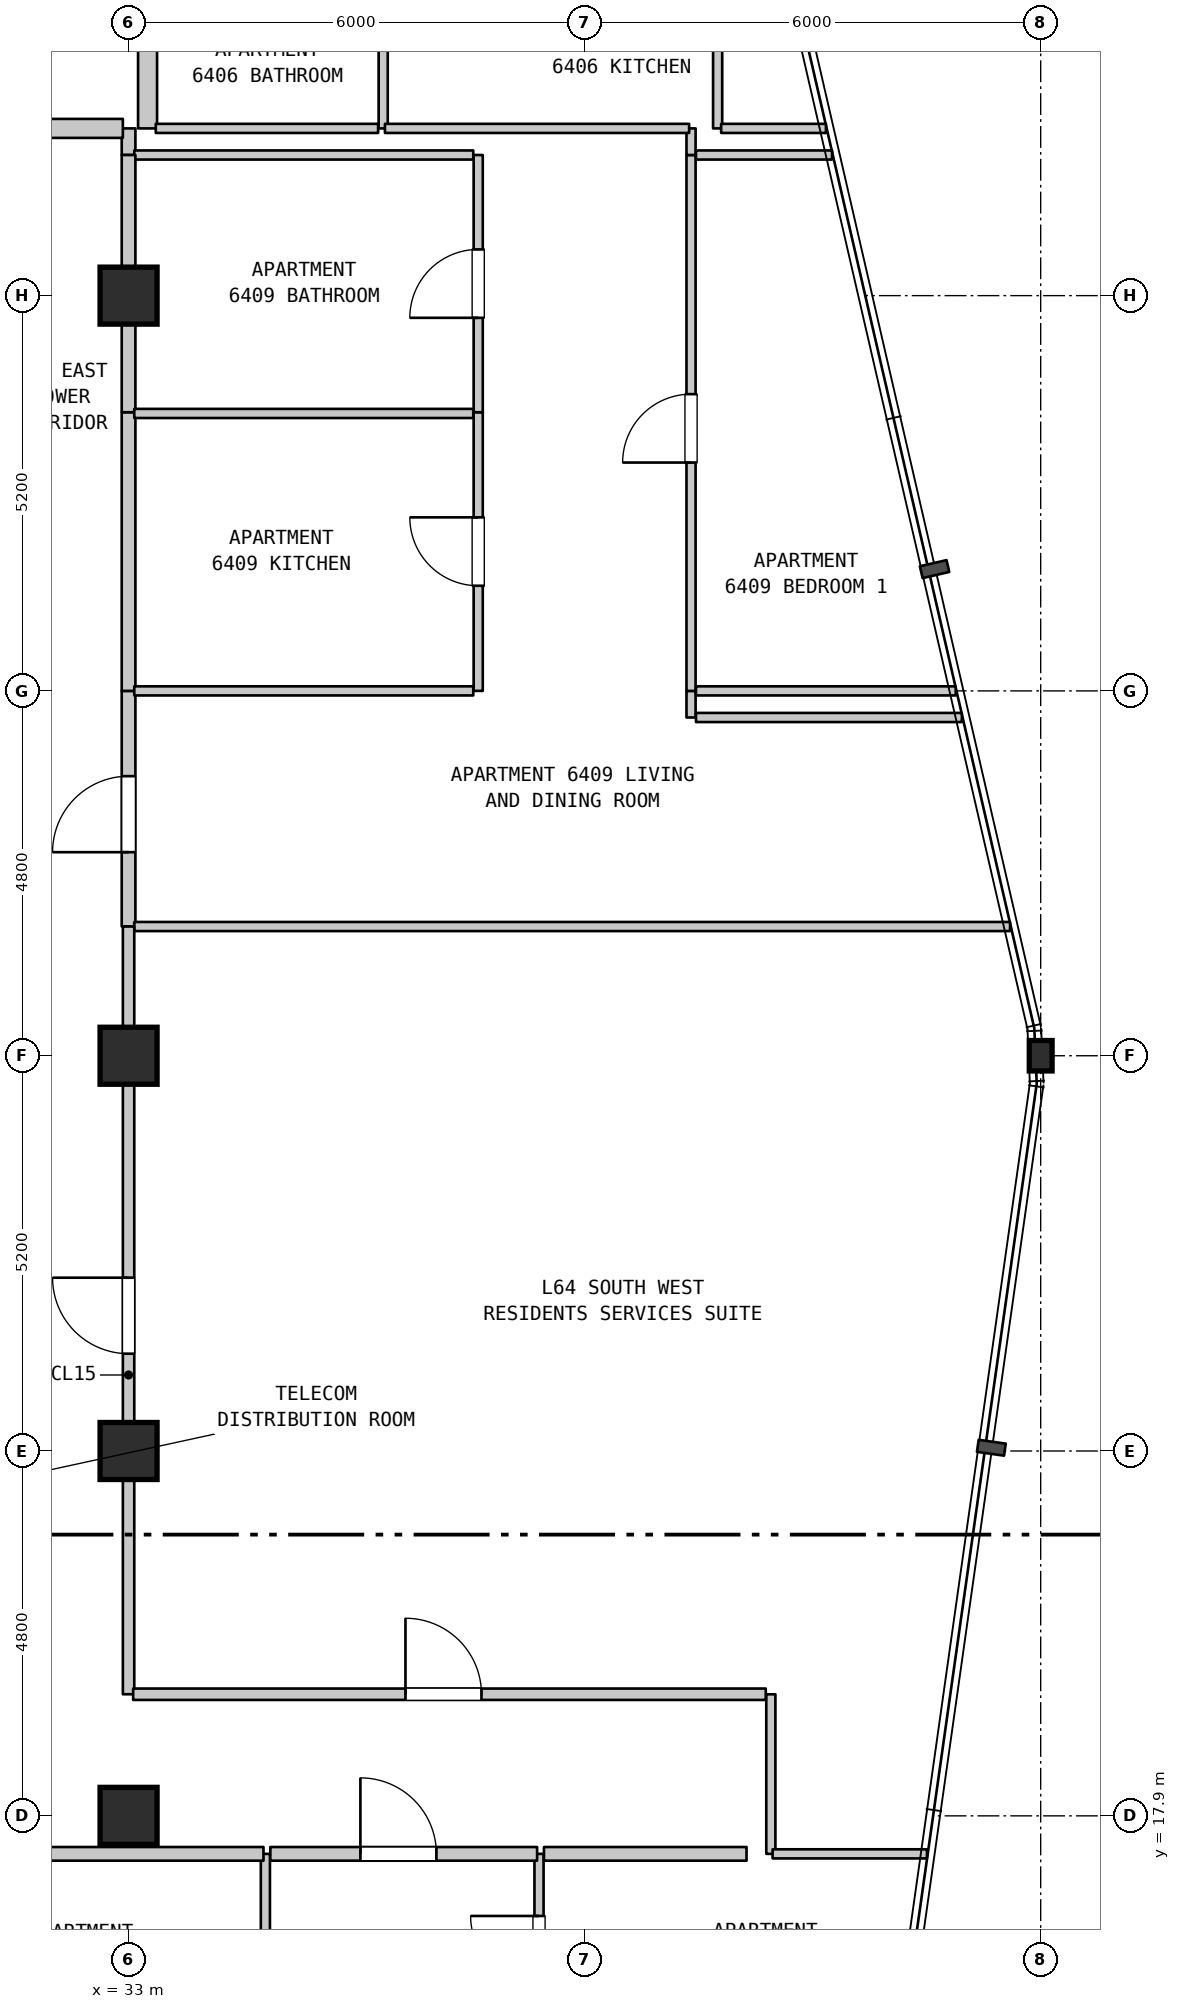
"""IFC4 building model, lengths in metres.
Left out: names, types, materials, properties, quantities, classifications, styles, units other than length and angle.
Written with IfcOpenShell. Run it as: python <this file> out.ifc"""

import sys

from ifc_helpers import new_model, si_unit, direction, frame, frame_2d, origin, origin_2d, place, context, subcontext, project, spatial, rectangle, i_section, extrude, element, fill, save


model = new_model("IFC4")
c1 = context("Model", 3, precision=1e-05, world=origin(), true_north=direction((0.0, 1.0)))
c2 = subcontext(c1, "Body", "Model", "MODEL_VIEW")
j1 = project(units=[si_unit("LENGTHUNIT", "METRE"), si_unit("PLANEANGLEUNIT", "RADIAN")], contexts=[c1])
p1 = place(None, origin())
s1 = spatial("IfcSite", under=j1, at=p1, CompositionType="ELEMENT")
p2 = place(p1, origin())
s2 = spatial("IfcBuilding", under=s1, at=p2, CompositionType="ELEMENT")
p3 = place(p2, frame((0.0, 0.0, 258.4)))
s3 = spatial("IfcBuildingStorey", under=s2, at=p3, CompositionType="ELEMENT", Elevation=258.4)
for number, where, z_axis, x_axis in (
    (1, (33.0, 17.9, 0.0), (0.0, 0.0, 1.0), (1.0, 0.0, 0.0)),
    (2, (33.0, 22.7, 0.0), (0.0, 0.0, 1.0), (1.0, 0.0, 0.0)),
    (3, (33.0, 27.9, 0.0), (0.0, 0.0, 1.0), (1.0, 0.0, 0.0)),
    (4, (33.0, 37.9, 0.0), (0.0, 0.0, 1.0), (1.0, 0.0, 0.0)),
):
    element("IfcColumn", number, at=place(p3, frame(where, z_axis=z_axis, x_axis=x_axis)), inside=s3, PredefinedType="COLUMN", context=c2, shape_type="SweptSolid", body=[
        extrude(rectangle(XDim=0.75, YDim=0.75, at=origin_2d()), origin(), (0.0, 0.0, 1.0), 3.7),
    ])
p4 = place(p3, frame((45.0, 27.9, 0.0), z_axis=(0.0, 0.0, 1.0), x_axis=(1.0, 0.0, 0.0)))
e5 = element("IfcColumn", 5, at=p4, inside=s3, PredefinedType="COLUMN", context=c2, shape_type="SweptSolid", body=[
    extrude(i_section(OverallWidth=0.3, OverallDepth=0.4, WebThickness=0.013, FlangeThickness=0.024, FilletRadius=0.027, at=origin_2d()), origin(), (0.0, 0.0, 1.0), 3.7),
])
p5 = place(p3, frame((33.0, 19.5, 0.0), z_axis=(0.0, 0.0, 1.0), x_axis=(0.0, 1.0, 0.0)))
e6 = element("IfcWall", 6, at=p5, inside=s3, PredefinedType="STANDARD", context=c2, shape_type="SweptSolid", body=[
    extrude(rectangle(XDim=8.4, YDim=0.15, at=frame_2d((4.2, 0.0))), origin(), (0.0, 0.0, 1.0), 3.1),
])
p6 = place(p5, frame((4.48, 0.0, 0.0)))
e7 = element("IfcOpeningElement", 7, at=p6, cuts=e6, PredefinedType="OPENING", context=c2, shape_type="SweptSolid", body=[
    extrude(rectangle(XDim=1.0, YDim=2.15, at=frame_2d((0.5, 1.075))), frame((0.0, 0.085, 0.0), z_axis=(0.0, -1.0, 0.0), x_axis=(1.0, 0.0, 0.0)), (0.0, 0.0, 1.0), 0.17),
])
p7 = place(p3, frame((33.0, 29.6, 0.0), z_axis=(0.0, 0.0, 1.0), x_axis=(0.0, 1.0, 0.0)))
e8 = element("IfcWall", 8, at=p7, inside=s3, PredefinedType="STANDARD", context=c2, shape_type="SweptSolid", body=[
    extrude(rectangle(XDim=3.1, YDim=0.18, at=frame_2d((1.55, 0.0))), origin(), (0.0, 0.0, 1.0), 2.89),
])
p8 = place(p7, frame((0.978, 0.0, 0.0)))
e9 = element("IfcOpeningElement", 9, at=p8, cuts=e8, PredefinedType="OPENING", context=c2, shape_type="SweptSolid", body=[
    extrude(rectangle(XDim=1.0, YDim=2.15, at=frame_2d((0.5, 1.075))), frame((0.0, 0.1, 0.0), z_axis=(0.0, -1.0, 0.0), x_axis=(1.0, 0.0, 0.0)), (0.0, 0.0, 1.0), 0.2),
])
p9 = place(p3, frame((33.0, 32.7, 0.0), z_axis=(0.0, 0.0, 1.0), x_axis=(0.0, 1.0, 0.0)))
e10 = element("IfcWall", 10, at=p9, inside=s3, PredefinedType="STANDARD", context=c2, shape_type="SweptSolid", body=[
    extrude(rectangle(XDim=3.666, YDim=0.18, at=frame_2d((1.833, 0.0))), origin(), (0.0, 0.0, 1.0), 2.89),
])
p10 = place(p3, frame((33.0, 36.366, 0.0), z_axis=(0.0, 0.0, 1.0), x_axis=(0.0, 1.0, 0.0)))
e11 = element("IfcWall", 11, at=p10, inside=s3, PredefinedType="STANDARD", context=c2, shape_type="SweptSolid", body=[
    extrude(rectangle(XDim=1.534, YDim=0.18, at=frame_2d((0.767, 0.0))), origin(), (0.0, 0.0, 1.0), 2.89),
])
p11 = place(p3, frame((33.0, 39.75, 0.0), z_axis=(0.0, 0.0, 1.0), x_axis=(0.0, 1.0, 0.0)))
e12 = element("IfcWall", 12, at=p11, inside=s3, PredefinedType="STANDARD", context=c2, shape_type="SweptSolid", body=[
    extrude(rectangle(XDim=0.35, YDim=0.18, at=frame_2d((0.175, 0.0))), origin(), (0.0, 0.0, 1.0), 3.39),
])
p12 = place(p3, frame((33.25, 40.1, 0.0), z_axis=(0.0, 0.0, 1.0), x_axis=(0.0, 1.0, 0.0)))
e13 = element("IfcWall", 13, at=p12, inside=s3, PredefinedType="STANDARD", context=c2, shape_type="SweptSolid", body=[
    extrude(rectangle(XDim=2.3, YDim=0.25, at=frame_2d((1.15, 0.0))), origin(), (0.0, 0.0, 1.0), 3.39),
])
p13 = place(p3, frame((34.8, 15.008, 0.0), z_axis=(0.0, 0.0, 1.0), x_axis=(0.0, 1.0, 0.0)))
e14 = element("IfcWall", 14, at=p13, inside=s3, PredefinedType="PARTITIONING", context=c2, shape_type="SweptSolid", body=[
    extrude(rectangle(XDim=2.392, YDim=0.12, at=frame_2d((1.196, 0.0))), origin(), (0.0, 0.0, 1.0), 3.39),
])
p14 = place(p3, frame((36.35, 40.1, 0.0), z_axis=(0.0, 0.0, 1.0), x_axis=(0.0, 1.0, 0.0)))
e15 = element("IfcWall", 15, at=p14, inside=s3, PredefinedType="PARTITIONING", context=c2, shape_type="SweptSolid", body=[
    extrude(rectangle(XDim=2.3, YDim=0.12, at=frame_2d((1.15, 0.0))), origin(), (0.0, 0.0, 1.0), 3.39),
])
p15 = place(p3, frame((37.6, 32.7, 0.0), z_axis=(0.0, 0.0, 1.0), x_axis=(0.0, 1.0, 0.0)))
e16 = element("IfcWall", 16, at=p15, inside=s3, PredefinedType="PARTITIONING", context=c2, shape_type="SweptSolid", body=[
    extrude(rectangle(XDim=3.666, YDim=0.12, at=frame_2d((1.833, 0.0))), origin(), (0.0, 0.0, 1.0), 3.39),
])
p16 = place(p15, frame((1.383, 0.0, 0.0)))
e17 = element("IfcOpeningElement", 17, at=p16, cuts=e16, PredefinedType="OPENING", context=c2, shape_type="SweptSolid", body=[
    extrude(rectangle(XDim=0.9, YDim=2.15, at=frame_2d((0.45, 1.075))), frame((0.0, 0.07, 0.0), z_axis=(0.0, -1.0, 0.0), x_axis=(1.0, 0.0, 0.0)), (0.0, 0.0, 1.0), 0.14),
])
p17 = place(p3, frame((37.6, 36.366, 0.0), z_axis=(0.0, 0.0, 1.0), x_axis=(0.0, 1.0, 0.0)))
e18 = element("IfcWall", 18, at=p17, inside=s3, PredefinedType="PARTITIONING", context=c2, shape_type="SweptSolid", body=[
    extrude(rectangle(XDim=3.384, YDim=0.12, at=frame_2d((1.692, 0.0))), origin(), (0.0, 0.0, 1.0), 3.39),
])
p18 = place(p17, frame((1.242, 0.0, 0.0)))
e19 = element("IfcOpeningElement", 19, at=p18, cuts=e18, PredefinedType="OPENING", context=c2, shape_type="SweptSolid", body=[
    extrude(rectangle(XDim=0.9, YDim=2.1, at=frame_2d((0.45, 1.05))), frame((0.0, 0.07, 0.0), z_axis=(0.0, -1.0, 0.0), x_axis=(1.0, 0.0, 0.0)), (0.0, 0.0, 1.0), 0.14),
])
p19 = place(p3, frame((38.4, 15.008, 0.0), z_axis=(0.0, 0.0, 1.0), x_axis=(0.0, 1.0, 0.0)))
e20 = element("IfcWall", 20, at=p19, inside=s3, PredefinedType="PARTITIONING", context=c2, shape_type="SweptSolid", body=[
    extrude(rectangle(XDim=2.392, YDim=0.12, at=frame_2d((1.196, 0.0))), origin(), (0.0, 0.0, 1.0), 3.39),
])
p20 = place(p19, frame((0.675, 0.0, 0.0)))
e21 = element("IfcOpeningElement", 21, at=p20, cuts=e20, PredefinedType="OPENING", context=c2, shape_type="SweptSolid", body=[
    extrude(rectangle(XDim=0.9, YDim=2.1, at=frame_2d((0.45, 1.05))), frame((0.0, 0.07, 0.0), z_axis=(0.0, -1.0, 0.0), x_axis=(1.0, 0.0, 0.0)), (0.0, 0.0, 1.0), 0.14),
])
p21 = place(p3, frame((40.4, 32.35, 0.0), z_axis=(0.0, 0.0, 1.0), x_axis=(0.0, 1.0, 0.0)))
e22 = element("IfcWall", 22, at=p21, inside=s3, PredefinedType="PARTITIONING", context=c2, shape_type="SweptSolid", body=[
    extrude(rectangle(XDim=0.35, YDim=0.12, at=frame_2d((0.175, 0.0))), origin(), (0.0, 0.0, 1.0), 3.39),
])
p22 = place(p3, frame((40.4, 32.7, 0.0), z_axis=(0.0, 0.0, 1.0), x_axis=(0.0, 1.0, 0.0)))
e23 = element("IfcWall", 23, at=p22, inside=s3, PredefinedType="PARTITIONING", context=c2, shape_type="SweptSolid", body=[
    extrude(rectangle(XDim=7.05, YDim=0.12, at=frame_2d((3.525, 0.0))), origin(), (0.0, 0.0, 1.0), 3.39),
])
p23 = place(p22, frame((3.004, 0.0, 0.0)))
e24 = element("IfcOpeningElement", 24, at=p23, cuts=e23, PredefinedType="OPENING", context=c2, shape_type="SweptSolid", body=[
    extrude(rectangle(XDim=0.9, YDim=2.15, at=frame_2d((0.45, 1.075))), frame((0.0, 0.07, 0.0), z_axis=(0.0, -1.0, 0.0), x_axis=(1.0, 0.0, 0.0)), (0.0, 0.0, 1.0), 0.14),
])
p24 = place(p3, frame((40.4, 39.75, 0.0), z_axis=(0.0, 0.0, 1.0), x_axis=(0.0, 1.0, 0.0)))
e25 = element("IfcWall", 25, at=p24, inside=s3, PredefinedType="PARTITIONING", context=c2, shape_type="SweptSolid", body=[
    extrude(rectangle(XDim=0.35, YDim=0.12, at=frame_2d((0.175, 0.0))), origin(), (0.0, 0.0, 1.0), 3.39),
])
p25 = place(p3, frame((40.75, 40.1, 0.0), z_axis=(0.0, 0.0, 1.0), x_axis=(0.0, 1.0, 0.0)))
e26 = element("IfcWall", 26, at=p25, inside=s3, PredefinedType="PARTITIONING", context=c2, shape_type="SweptSolid", body=[
    extrude(rectangle(XDim=2.3, YDim=0.12, at=frame_2d((1.15, 0.0))), origin(), (0.0, 0.0, 1.0), 3.39),
])
p26 = place(p3, frame((41.45, 17.4, 0.0), z_axis=(0.0, 0.0, 1.0), x_axis=(0.0, 1.0, 0.0)))
e27 = element("IfcWall", 27, at=p26, inside=s3, PredefinedType="PARTITIONING", context=c2, shape_type="SweptSolid", body=[
    extrude(rectangle(XDim=2.099, YDim=0.12, at=frame_2d((1.05, 0.0))), origin(), (0.0, 0.0, 1.0), 3.39),
])
p27 = place(p3, frame((29.585, 17.4, 0.0), z_axis=(0.0, 0.0, 1.0), x_axis=(1.0, 0.0, 0.0)))
e28 = element("IfcWall", 28, at=p27, inside=s3, PredefinedType="STANDARD", context=c2, shape_type="SweptSolid", body=[
    extrude(rectangle(XDim=5.19, YDim=0.18, at=frame_2d((2.595, 0.0))), origin(), (0.0, 0.0, 1.0), 3.39),
])
p28 = place(p3, frame((34.865, 17.4, 0.0), z_axis=(0.0, 0.0, 1.0), x_axis=(1.0, 0.0, 0.0)))
e29 = element("IfcWall", 29, at=p28, inside=s3, PredefinedType="STANDARD", context=c2, shape_type="SweptSolid", body=[
    extrude(rectangle(XDim=3.51, YDim=0.18, at=frame_2d((1.755, 0.0))), origin(), (0.0, 0.0, 1.0), 3.39),
])
p29 = place(p28, frame((1.185, 0.0, 0.0)))
e30 = element("IfcOpeningElement", 30, at=p29, cuts=e29, PredefinedType="OPENING", context=c2, shape_type="SweptSolid", body=[
    extrude(rectangle(XDim=1.0, YDim=2.15, at=frame_2d((0.5, 1.075))), frame((0.0, 0.1, 0.0), z_axis=(0.0, -1.0, 0.0), x_axis=(1.0, 0.0, 0.0)), (0.0, 0.0, 1.0), 0.2),
])
p30 = place(p3, frame((38.465, 17.4, 0.0), z_axis=(0.0, 0.0, 1.0), x_axis=(1.0, 0.0, 0.0)))
e31 = element("IfcWall", 31, at=p30, inside=s3, PredefinedType="STANDARD", context=c2, shape_type="SweptSolid", body=[
    extrude(rectangle(XDim=2.665, YDim=0.18, at=frame_2d((1.333, 0.0))), origin(), (0.0, 0.0, 1.0), 3.39),
])
p31 = place(p3, frame((41.473, 17.4, 0.0), z_axis=(0.0, 0.0, 1.0), x_axis=(1.0, 0.0, 0.0)))
e32 = element("IfcWall", 32, at=p31, inside=s3, PredefinedType="PARTITIONING", context=c2, shape_type="SweptSolid", body=[
    extrude(rectangle(XDim=2.031, YDim=0.12, at=frame_2d((1.016, 0.0))), origin(), (0.0, 0.0, 1.0), 3.39),
])
p32 = place(p3, frame((33.06, 19.5, 0.0), z_axis=(0.0, 0.0, 1.0), x_axis=(1.0, 0.0, 0.0)))
e33 = element("IfcWall", 33, at=p32, inside=s3, PredefinedType="STANDARD", context=c2, shape_type="SweptSolid", body=[
    extrude(rectangle(XDim=8.323, YDim=0.15, at=frame_2d((4.162, 0.0))), origin(), (0.0, 0.0, 1.0), 3.39),
])
p33 = place(p32, frame((3.583, 0.0, 0.0)))
e34 = element("IfcOpeningElement", 34, at=p33, cuts=e33, PredefinedType="OPENING", context=c2, shape_type="SweptSolid", body=[
    extrude(rectangle(XDim=1.0, YDim=2.15, at=frame_2d((0.5, 1.075))), frame((0.0, 0.085, 0.0), z_axis=(0.0, -1.0, 0.0), x_axis=(1.0, 0.0, 0.0)), (0.0, 0.0, 1.0), 0.17),
])
p34 = place(p3, frame((33.075, 29.6, 0.0), z_axis=(0.0, 0.0, 1.0), x_axis=(1.0, 0.0, 0.0)))
e35 = element("IfcWall", 35, at=p34, inside=s3, PredefinedType="PARTITIONING", context=c2, shape_type="SweptSolid", body=[
    extrude(rectangle(XDim=11.522, YDim=0.12, at=frame_2d((5.761, 0.0))), origin(), (0.0, 0.0, 1.0), 3.39),
])
p35 = place(p3, frame((40.465, 32.35, 0.0), z_axis=(0.0, 0.0, 1.0), x_axis=(1.0, 0.0, 0.0)))
e36 = element("IfcWall", 36, at=p35, inside=s3, PredefinedType="PARTITIONING", context=c2, shape_type="SweptSolid", body=[
    extrude(rectangle(XDim=3.498, YDim=0.12, at=frame_2d((1.749, 0.0))), origin(), (0.0, 0.0, 1.0), 3.39),
])
p36 = place(p3, frame((33.075, 32.7, 0.0), z_axis=(0.0, 0.0, 1.0), x_axis=(1.0, 0.0, 0.0)))
e37 = element("IfcWall", 37, at=p36, inside=s3, PredefinedType="PARTITIONING", context=c2, shape_type="SweptSolid", body=[
    extrude(rectangle(XDim=4.46, YDim=0.12, at=frame_2d((2.23, 0.0))), origin(), (0.0, 0.0, 1.0), 3.39),
])
p37 = place(p3, frame((40.465, 32.7, 0.0), z_axis=(0.0, 0.0, 1.0), x_axis=(1.0, 0.0, 0.0)))
e38 = element("IfcWall", 38, at=p37, inside=s3, PredefinedType="PARTITIONING", context=c2, shape_type="SweptSolid", body=[
    extrude(rectangle(XDim=3.417, YDim=0.12, at=frame_2d((1.708, 0.0))), origin(), (0.0, 0.0, 1.0), 3.39),
])
for number, where, z_axis, x_axis in (
    (39, (33.075, 36.35, 0.0), (0.0, 0.0, 1.0), (1.0, 0.0, 0.0)),
    (40, (33.075, 39.75, 0.0), (0.0, 0.0, 1.0), (1.0, 0.0, 0.0)),
):
    element("IfcWall", number, at=place(p3, frame(where, z_axis=z_axis, x_axis=x_axis)), inside=s3, PredefinedType="PARTITIONING", context=c2, shape_type="SweptSolid", body=[
        extrude(rectangle(XDim=4.46, YDim=0.12, at=frame_2d((2.23, 0.0))), origin(), (0.0, 0.0, 1.0), 3.39),
    ])
p38 = place(p3, frame((40.465, 39.75, 0.0), z_axis=(0.0, 0.0, 1.0), x_axis=(1.0, 0.0, 0.0)))
e41 = element("IfcWall", 41, at=p38, inside=s3, PredefinedType="PARTITIONING", context=c2, shape_type="SweptSolid", body=[
    extrude(rectangle(XDim=1.79, YDim=0.12, at=frame_2d((0.895, 0.0))), origin(), (0.0, 0.0, 1.0), 3.39),
])
p39 = place(p3, frame((29.86, 40.1, 0.0), z_axis=(0.0, 0.0, 1.0), x_axis=(1.0, 0.0, 0.0)))
e42 = element("IfcWall", 42, at=p39, inside=s3, PredefinedType="STANDARD", context=c2, shape_type="SweptSolid", body=[
    extrude(rectangle(XDim=3.065, YDim=0.25, at=frame_2d((1.532, 0.0))), origin(), (0.0, 0.0, 1.0), 3.39),
])
p40 = place(p3, frame((33.358, 40.1, 0.0), z_axis=(0.0, 0.0, 1.0), x_axis=(1.0, 0.0, 0.0)))
e43 = element("IfcWall", 43, at=p40, inside=s3, PredefinedType="PARTITIONING", context=c2, shape_type="SweptSolid", body=[
    extrude(rectangle(XDim=2.925, YDim=0.12, at=frame_2d((1.462, 0.0))), origin(), (0.0, 0.0, 1.0), 3.39),
])
p41 = place(p3, frame((36.373, 40.1, 0.0), z_axis=(0.0, 0.0, 1.0), x_axis=(1.0, 0.0, 0.0)))
e44 = element("IfcWall", 44, at=p41, inside=s3, PredefinedType="PARTITIONING", context=c2, shape_type="SweptSolid", body=[
    extrude(rectangle(XDim=4.002, YDim=0.12, at=frame_2d((2.001, 0.0))), origin(), (0.0, 0.0, 1.0), 3.39),
])
p42 = place(p3, frame((40.796, 40.1, 0.0), z_axis=(0.0, 0.0, 1.0), x_axis=(1.0, 0.0, 0.0)))
e45 = element("IfcWall", 45, at=p42, inside=s3, PredefinedType="PARTITIONING", context=c2, shape_type="SweptSolid", body=[
    extrude(rectangle(XDim=1.379, YDim=0.12, at=frame_2d((0.689, 0.0))), origin(), (0.0, 0.0, 1.0), 3.39),
])
p43 = place(p3, frame((33.0, 27.9, 0.0), z_axis=(0.0, 0.0, 1.0), x_axis=(0.0, 1.0, 0.0)))
e46 = element("IfcWall", 46, at=p43, inside=s3, PredefinedType="STANDARD", context=c2, shape_type="SweptSolid", body=[
    extrude(rectangle(XDim=1.7, YDim=0.15, at=frame_2d((0.85, 0.0))), origin(), (0.0, 0.0, 1.0), 2.89),
])
p44 = place(p3, frame((33.0, 37.9, 0.0), z_axis=(0.0, 0.0, 1.0), x_axis=(0.0, 1.0, 0.0)))
e47 = element("IfcWall", 47, at=p44, inside=s3, PredefinedType="STANDARD", context=c2, shape_type="SweptSolid", body=[
    extrude(rectangle(XDim=1.85, YDim=0.18, at=frame_2d((0.925, 0.0))), origin(), (0.0, 0.0, 1.0), 2.79),
])
p45 = place(p6, origin())
e48 = element("IfcDoor", 48, at=p45, inside=s3, OperationType="SINGLE_SWING_RIGHT", PredefinedType="DOOR", context=c2, shape_type="SweptSolid", body=[
    extrude(rectangle(XDim=1.0, YDim=2.15, at=frame_2d((0.5, 1.075))), frame((0.0, 0.025, 0.0), z_axis=(0.0, -1.0, 0.0), x_axis=(1.0, 0.0, 0.0)), (0.0, 0.0, 1.0), 0.05),
])
fill(e7, e48)
p46 = place(p8, origin())
e49 = element("IfcDoor", 49, at=p46, inside=s3, OperationType="SINGLE_SWING_LEFT", PredefinedType="DOOR", context=c2, shape_type="SweptSolid", body=[
    extrude(rectangle(XDim=1.0, YDim=2.15, at=frame_2d((0.5, 1.075))), frame((0.0, 0.025, 0.0), z_axis=(0.0, -1.0, 0.0), x_axis=(1.0, 0.0, 0.0)), (0.0, 0.0, 1.0), 0.05),
])
fill(e9, e49)
p47 = place(p16, origin())
e50 = element("IfcDoor", 50, at=p47, inside=s3, OperationType="SINGLE_SWING_RIGHT", PredefinedType="DOOR", context=c2, shape_type="SweptSolid", body=[
    extrude(rectangle(XDim=0.9, YDim=2.15, at=frame_2d((0.45, 1.075))), frame((0.0, 0.025, 0.0), z_axis=(0.0, -1.0, 0.0), x_axis=(1.0, 0.0, 0.0)), (0.0, 0.0, 1.0), 0.05),
])
fill(e17, e50)
p48 = place(p18, origin())
e51 = element("IfcDoor", 51, at=p48, inside=s3, OperationType="SINGLE_SWING_LEFT", PredefinedType="DOOR", context=c2, shape_type="SweptSolid", body=[
    extrude(rectangle(XDim=0.9, YDim=2.1, at=frame_2d((0.45, 1.05))), frame((0.0, 0.025, 0.0), z_axis=(0.0, -1.0, 0.0), x_axis=(1.0, 0.0, 0.0)), (0.0, 0.0, 1.0), 0.05),
])
fill(e19, e51)
p49 = place(p20, origin())
e52 = element("IfcDoor", 52, at=p49, inside=s3, OperationType="SINGLE_SWING_RIGHT", PredefinedType="DOOR", context=c2, shape_type="SweptSolid", body=[
    extrude(rectangle(XDim=0.9, YDim=2.1, at=frame_2d((0.45, 1.05))), frame((0.0, 0.025, 0.0), z_axis=(0.0, -1.0, 0.0), x_axis=(1.0, 0.0, 0.0)), (0.0, 0.0, 1.0), 0.05),
])
fill(e21, e52)
p50 = place(p23, origin())
e53 = element("IfcDoor", 53, at=p50, inside=s3, OperationType="SINGLE_SWING_LEFT", PredefinedType="DOOR", context=c2, shape_type="SweptSolid", body=[
    extrude(rectangle(XDim=0.9, YDim=2.15, at=frame_2d((0.45, 1.075))), frame((0.0, 0.025, 0.0), z_axis=(0.0, -1.0, 0.0), x_axis=(1.0, 0.0, 0.0)), (0.0, 0.0, 1.0), 0.05),
])
fill(e24, e53)
p51 = place(p29, origin())
e54 = element("IfcDoor", 54, at=p51, inside=s3, OperationType="SINGLE_SWING_LEFT", PredefinedType="DOOR", context=c2, shape_type="SweptSolid", body=[
    extrude(rectangle(XDim=1.0, YDim=2.15, at=frame_2d((0.5, 1.075))), frame((0.0, 0.025, 0.0), z_axis=(0.0, -1.0, 0.0), x_axis=(1.0, 0.0, 0.0)), (0.0, 0.0, 1.0), 0.05),
])
fill(e30, e54)
p52 = place(p33, origin())
e55 = element("IfcDoor", 55, at=p52, inside=s3, OperationType="SINGLE_SWING_LEFT", PredefinedType="DOOR", context=c2, shape_type="SweptSolid", body=[
    extrude(rectangle(XDim=1.0, YDim=2.15, at=frame_2d((0.5, 1.075))), frame((0.0, 0.025, 0.0), z_axis=(0.0, -1.0, 0.0), x_axis=(1.0, 0.0, 0.0)), (0.0, 0.0, 1.0), 0.05),
])
fill(e34, e55)
save(model, sys.argv[1])
